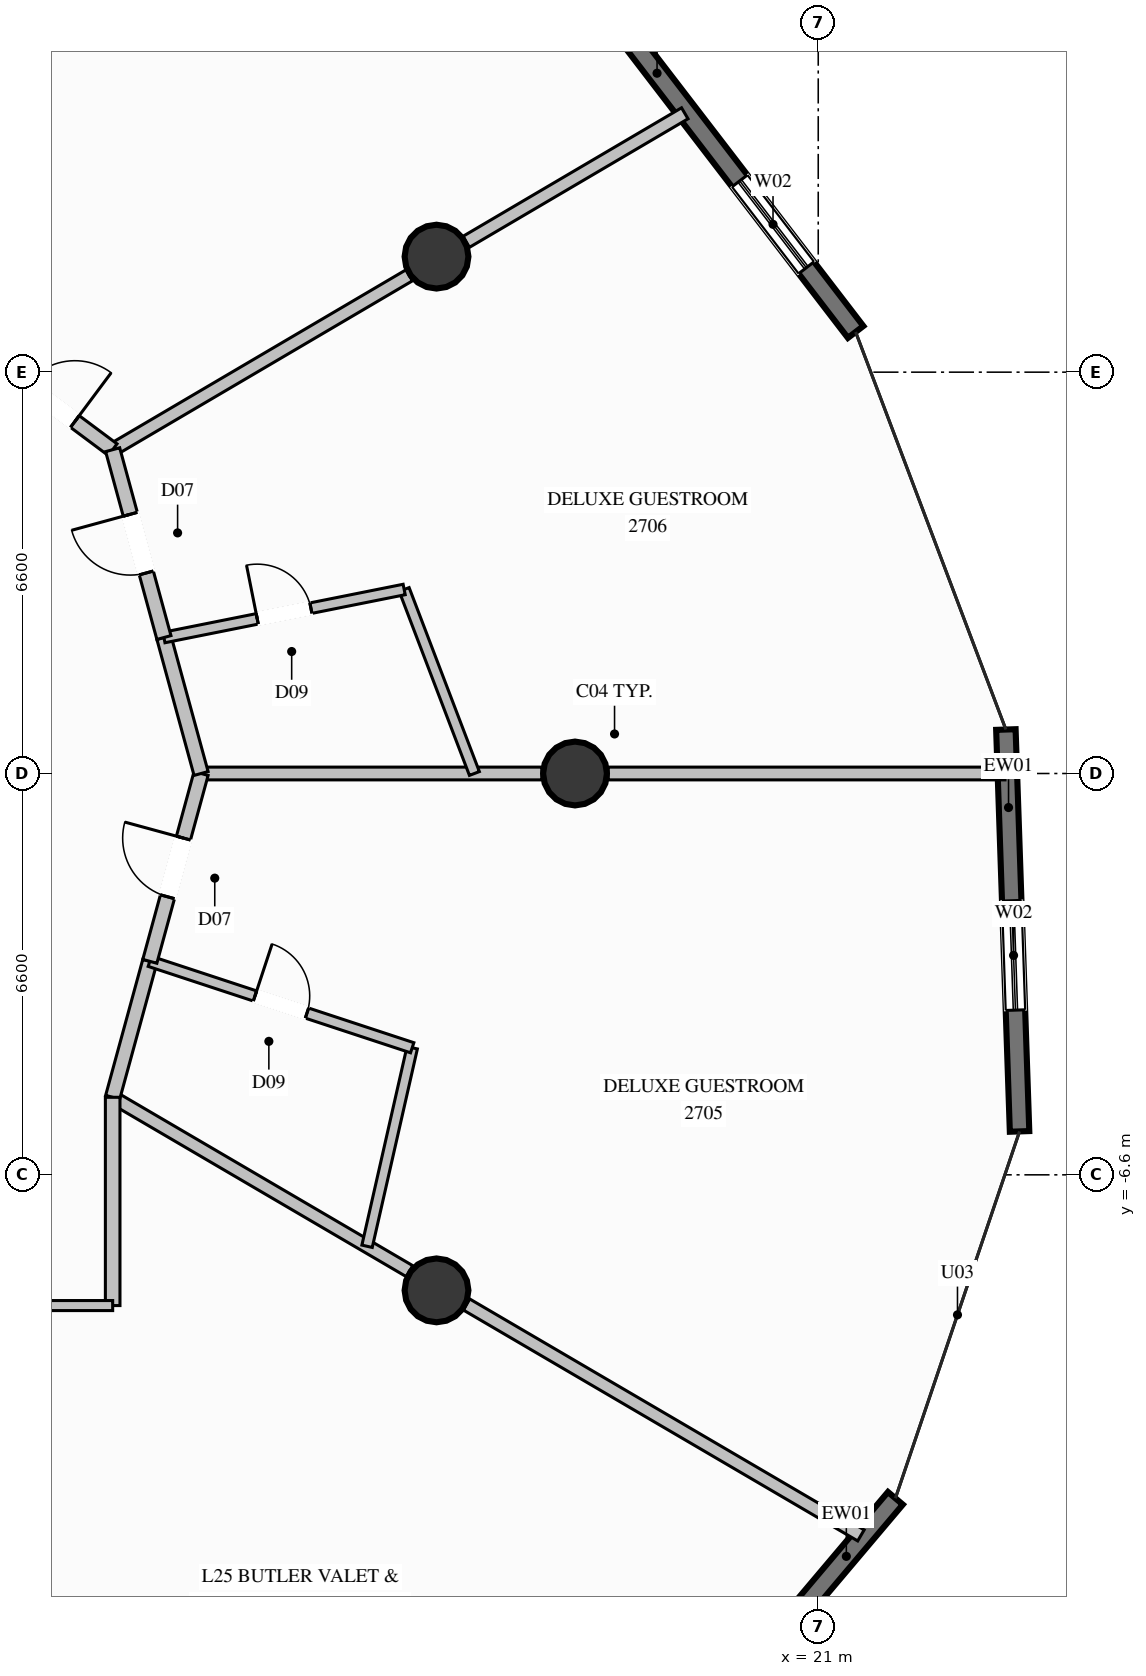
"""IFC4 building model, lengths in metres.
Left out: names, types, materials, properties, quantities, classifications, styles, units other than length and angle.
Written with IfcOpenShell. Run it as: python <this file> out.ifc"""

import sys

from ifc_helpers import new_model, si_unit, direction, frame, frame_2d, origin, origin_2d, place, context, subcontext, project, spatial, rectangle, circle, extrude, element, fill, save


model = new_model("IFC4")
c1 = context("Model", 3, precision=1e-05, world=origin(), true_north=direction((0.0, 1.0)))
c2 = subcontext(c1, "Body", "Model", "MODEL_VIEW")
j1 = project(units=[si_unit("LENGTHUNIT", "METRE"), si_unit("PLANEANGLEUNIT", "RADIAN")], contexts=[c1])
p1 = place(None, origin())
s1 = spatial("IfcSite", under=j1, at=p1, CompositionType="ELEMENT")
p2 = place(p1, origin())
s2 = spatial("IfcBuilding", under=s1, at=p2, CompositionType="ELEMENT")
p3 = place(p2, frame((0.0, 0.0, 102.6)))
s3 = spatial("IfcBuildingStorey", under=s2, at=p3, CompositionType="ELEMENT", Elevation=102.6)
for number, where, z_axis, x_axis in (
    (1, (17.0, 0.0, 0.0), (0.0, 0.0, 1.0), (1.0, 0.0, 0.0)),
    (2, (14.722, 8.5, 0.0), (0.0, 0.0, 1.0), (1.0, 0.0, 0.0)),
    (3, (14.722, -8.5, 0.0), (0.0, 0.0, 1.0), (1.0, 0.0, 0.0)),
):
    element("IfcColumn", number, at=place(p3, frame(where, z_axis=z_axis, x_axis=x_axis)), inside=s3, PredefinedType="COLUMN", context=c2, shape_type="SweptSolid", body=[
        extrude(circle(Radius=0.525, at=origin_2d()), origin(), (0.0, 0.0, 1.0), 3.6),
    ])
p4 = place(p3, frame((24.086, 0.723, 0.0), z_axis=(0.0, 0.0, 1.0), x_axis=(0.034040106065, -0.999420467661, 0.0)))
e4 = element("IfcWall", 4, at=p4, inside=s3, PredefinedType="SOLIDWALL", context=c2, shape_type="SweptSolid", body=[
    extrude(rectangle(XDim=6.613, YDim=0.32, at=frame_2d((3.306, 0.0))), origin(), (0.0, 0.0, 1.0), 3.35),
])
p5 = place(p4, frame((2.817, 0.0, 0.35)))
e5 = element("IfcOpeningElement", 5, at=p5, cuts=e4, PredefinedType="OPENING", context=c2, shape_type="SweptSolid", body=[
    extrude(rectangle(XDim=1.8, YDim=2.6, at=frame_2d((0.9, 1.3))), frame((0.0, 0.17, 0.0), z_axis=(0.0, -1.0, 0.0), x_axis=(1.0, 0.0, 0.0)), (0.0, 0.0, 1.0), 0.34),
])
p6 = place(p3, frame((17.142, 13.089, 0.0), z_axis=(0.0, 0.0, 1.0), x_axis=(0.608831916989, -0.793299247986, 0.0)))
e6 = element("IfcWall", 6, at=p6, inside=s3, PredefinedType="SOLIDWALL", context=c2, shape_type="SweptSolid", body=[
    extrude(rectangle(XDim=7.347, YDim=0.32, at=frame_2d((3.673, 0.0))), origin(), (0.0, 0.0, 1.0), 3.35),
])
p7 = place(p6, frame((4.215, 0.0, 0.35)))
e7 = element("IfcOpeningElement", 7, at=p7, cuts=e6, PredefinedType="OPENING", context=c2, shape_type="SweptSolid", body=[
    extrude(rectangle(XDim=1.8, YDim=2.6, at=frame_2d((0.9, 1.3))), frame((0.0, 0.17, 0.0), z_axis=(0.0, -1.0, 0.0), x_axis=(1.0, 0.0, 0.0)), (0.0, 0.0, 1.0), 0.34),
])
p8 = place(p3, frame((22.269, -11.919, 0.0), z_axis=(0.0, 0.0, 1.0), x_axis=(-0.645278763483, -0.763947195425, 0.0)))
e8 = element("IfcWall", 8, at=p8, inside=s3, PredefinedType="SOLIDWALL", context=c2, shape_type="SweptSolid", body=[
    extrude(rectangle(XDim=6.369, YDim=0.32, at=frame_2d((3.185, 0.0))), origin(), (0.0, 0.0, 1.0), 3.35),
])
p9 = place(p8, frame((2.751, 0.0, 0.35)))
e9 = element("IfcOpeningElement", 9, at=p9, cuts=e8, PredefinedType="OPENING", context=c2, shape_type="SweptSolid", body=[
    extrude(rectangle(XDim=1.8, YDim=2.6, at=frame_2d((0.9, 1.3))), frame((0.0, 0.17, 0.0), z_axis=(0.0, -1.0, 0.0), x_axis=(1.0, 0.0, 0.0)), (0.0, 0.0, 1.0), 0.34),
])
p10 = place(p3, frame((10.85, 0.0, 0.0), z_axis=(0.0, 0.0, 1.0), x_axis=(1.0, 0.0, 0.0)))
e10 = element("IfcWall", 10, at=p10, inside=s3, PredefinedType="PARTITIONING", context=c2, shape_type="SweptSolid", body=[
    extrude(rectangle(XDim=5.605, YDim=0.21, at=frame_2d((2.802, 0.0))), origin(), (0.0, 0.0, 1.0), 3.35),
])
p11 = place(p3, frame((17.545, 0.0, 0.0), z_axis=(0.0, 0.0, 1.0), x_axis=(1.0, 0.0, 0.0)))
e11 = element("IfcWall", 11, at=p11, inside=s3, PredefinedType="PARTITIONING", context=c2, shape_type="SweptSolid", body=[
    extrude(rectangle(XDim=6.526, YDim=0.21, at=frame_2d((3.263, 0.0))), origin(), (0.0, 0.0, 1.0), 3.35),
])
p12 = place(p3, frame((9.396, 5.325, 0.0), z_axis=(0.0, 0.0, 1.0), x_axis=(0.862032950085, 0.506852239778, 0.0)))
e12 = element("IfcWall", 12, at=p12, inside=s3, PredefinedType="PARTITIONING", context=c2, shape_type="SweptSolid", body=[
    extrude(rectangle(XDim=5.656, YDim=0.21, at=frame_2d((2.828, 0.0))), origin(), (0.0, 0.0, 1.0), 2.791),
])
p13 = place(p3, frame((15.21, 8.743, 0.0), z_axis=(0.0, 0.0, 1.0), x_axis=(0.862004936616, 0.506899880894, 0.0)))
e13 = element("IfcWall", 13, at=p13, inside=s3, PredefinedType="PARTITIONING", context=c2, shape_type="SweptSolid", body=[
    extrude(rectangle(XDim=4.17, YDim=0.21, at=frame_2d((2.085, 0.0))), origin(), (0.0, 0.0, 1.0), 3.35),
])
p14 = place(p3, frame((9.396, -5.325, 0.0), z_axis=(0.0, 0.0, 1.0), x_axis=(0.862912125579, -0.505353998232, 0.0)))
e14 = element("IfcWall", 14, at=p14, inside=s3, PredefinedType="PARTITIONING", context=c2, shape_type="SweptSolid", body=[
    extrude(rectangle(XDim=5.658, YDim=0.21, at=frame_2d((2.829, 0.0))), origin(), (0.0, 0.0, 1.0), 2.791),
])
p15 = place(p3, frame((15.215, -8.732, 0.0), z_axis=(0.0, 0.0, 1.0), x_axis=(0.862960241997, -0.505271828556, 0.0)))
e15 = element("IfcWall", 15, at=p15, inside=s3, PredefinedType="PARTITIONING", context=c2, shape_type="SweptSolid", body=[
    extrude(rectangle(XDim=7.517, YDim=0.21, at=frame_2d((3.758, 0.0))), origin(), (0.0, 0.0, 1.0), 3.35),
])
p16 = place(p3, frame((7.35, 6.85, 0.0), z_axis=(0.0, 0.0, 1.0), x_axis=(0.8017416961, -0.597670689205, 0.0)))
e16 = element("IfcWall", 16, at=p16, inside=s3, PredefinedType="PARTITIONING", context=c2, shape_type="SweptSolid", body=[
    extrude(rectangle(XDim=2.552, YDim=0.24, at=frame_2d((1.276, 0.0))), origin(), (0.0, 0.0, 1.0), 3.35),
])
p17 = place(p16, frame((0.776, 0.0, 0.0)))
e17 = element("IfcOpeningElement", 17, at=p17, cuts=e16, PredefinedType="OPENING", context=c2, shape_type="SweptSolid", body=[
    extrude(rectangle(XDim=1.0, YDim=2.2, at=frame_2d((0.5, 1.1))), frame((0.0, 0.13, 0.0), z_axis=(0.0, -1.0, 0.0), x_axis=(1.0, 0.0, 0.0)), (0.0, 0.0, 1.0), 0.26),
])
p18 = place(p3, frame((9.396, -5.325, 0.0), z_axis=(0.0, 0.0, 1.0), x_axis=(0.263643210908, 0.964620265878, 0.0)))
e18 = element("IfcWall", 18, at=p18, inside=s3, PredefinedType="PARTITIONING", context=c2, shape_type="SweptSolid", body=[
    extrude(rectangle(XDim=2.318, YDim=0.24, at=frame_2d((1.159, 0.0))), origin(), (0.0, 0.0, 1.0), 3.35),
])
p19 = place(p3, frame((13.58, -7.775, 0.0), z_axis=(0.0, 0.0, 1.0), x_axis=(0.221599041774, 0.975137869578, 0.0)))
e19 = element("IfcWall", 19, at=p19, inside=s3, PredefinedType="PLUMBINGWALL", context=c2, shape_type="SweptSolid", body=[
    extrude(rectangle(XDim=3.348, YDim=0.175, at=frame_2d((1.674, 0.0))), origin(), (0.0, 0.0, 1.0), 3.35),
])
p20 = place(p3, frame((10.007, -3.089, 0.0), z_axis=(0.0, 0.0, 1.0), x_axis=(0.949827092004, -0.312775471057, 0.0)))
e20 = element("IfcWall", 20, at=p20, inside=s3, PredefinedType="PLUMBINGWALL", context=c2, shape_type="SweptSolid", body=[
    extrude(rectangle(XDim=4.543, YDim=0.175, at=frame_2d((2.271, 0.0))), origin(), (0.0, 0.0, 1.0), 3.35),
])
p21 = place(p20, frame((1.821, 0.0, 0.0)))
e21 = element("IfcOpeningElement", 21, at=p21, cuts=e20, PredefinedType="OPENING", context=c2, shape_type="SweptSolid", body=[
    extrude(rectangle(XDim=0.9, YDim=2.1, at=frame_2d((0.45, 1.05))), frame((0.0, 0.098, 0.0), z_axis=(0.0, -1.0, 0.0), x_axis=(1.0, 0.0, 0.0)), (0.0, 0.0, 1.0), 0.195),
])
p22 = place(p3, frame((10.007, -3.089, 0.0), z_axis=(0.0, 0.0, 1.0), x_axis=(0.263272237376, 0.964721581093, 0.0)))
e22 = element("IfcWall", 22, at=p22, inside=s3, PredefinedType="PARTITIONING", context=c2, shape_type="SweptSolid", body=[
    extrude(rectangle(XDim=3.202, YDim=0.24, at=frame_2d((1.601, 0.0))), origin(), (0.0, 0.0, 1.0), 2.985),
])
p23 = place(p22, frame((1.101, 0.0, 0.0)))
e23 = element("IfcOpeningElement", 23, at=p23, cuts=e22, PredefinedType="OPENING", context=c2, shape_type="SweptSolid", body=[
    extrude(rectangle(XDim=1.0, YDim=2.2, at=frame_2d((0.5, 1.1))), frame((0.0, 0.13, 0.0), z_axis=(0.0, -1.0, 0.0), x_axis=(1.0, 0.0, 0.0)), (0.0, 0.0, 1.0), 0.26),
])
p24 = place(p3, frame((10.85, 0.0, 0.0), z_axis=(0.0, 0.0, 1.0), x_axis=(-0.263616426241, 0.964627586074, 0.0)))
e24 = element("IfcWall", 24, at=p24, inside=s3, PredefinedType="PARTITIONING", context=c2, shape_type="SweptSolid", body=[
    extrude(rectangle(XDim=2.318, YDim=0.24, at=frame_2d((1.159, 0.0))), origin(), (0.0, 0.0, 1.0), 2.985),
])
p25 = place(p3, frame((15.345, 0.0, 0.0), z_axis=(0.0, 0.0, 1.0), x_axis=(-0.35661902988, 0.934249895653, 0.0)))
e25 = element("IfcWall", 25, at=p25, inside=s3, PredefinedType="PLUMBINGWALL", context=c2, shape_type="SweptSolid", body=[
    extrude(rectangle(XDim=3.239, YDim=0.175, at=frame_2d((1.619, 0.0))), origin(), (0.0, 0.0, 1.0), 3.35),
])
p26 = place(p3, frame((10.239, 2.236, 0.0), z_axis=(0.0, 0.0, 1.0), x_axis=(0.980599315693, 0.196022912085, 0.0)))
e26 = element("IfcWall", 26, at=p26, inside=s3, PredefinedType="PLUMBINGWALL", context=c2, shape_type="SweptSolid", body=[
    extrude(rectangle(XDim=4.029, YDim=0.175, at=frame_2d((2.015, 0.0))), origin(), (0.0, 0.0, 1.0), 3.35),
])
p27 = place(p26, frame((1.565, 0.0, 0.0)))
e27 = element("IfcOpeningElement", 27, at=p27, cuts=e26, PredefinedType="OPENING", context=c2, shape_type="SweptSolid", body=[
    extrude(rectangle(XDim=0.9, YDim=2.1, at=frame_2d((0.45, 1.05))), frame((0.0, 0.098, 0.0), z_axis=(0.0, -1.0, 0.0), x_axis=(1.0, 0.0, 0.0)), (0.0, 0.0, 1.0), 0.195),
])
p28 = place(p3, frame((10.239, 2.236, 0.0), z_axis=(0.0, 0.0, 1.0), x_axis=(-0.26329160366, 0.964716295831, 0.0)))
e28 = element("IfcWall", 28, at=p28, inside=s3, PredefinedType="PARTITIONING", context=c2, shape_type="SweptSolid", body=[
    extrude(rectangle(XDim=3.202, YDim=0.24, at=frame_2d((1.601, 0.0))), origin(), (0.0, 0.0, 1.0), 3.35),
])
p29 = place(p28, frame((1.101, 0.0, 0.0)))
e29 = element("IfcOpeningElement", 29, at=p29, cuts=e28, PredefinedType="OPENING", context=c2, shape_type="SweptSolid", body=[
    extrude(rectangle(XDim=1.0, YDim=2.2, at=frame_2d((0.5, 1.1))), frame((0.0, 0.13, 0.0), z_axis=(0.0, -1.0, 0.0), x_axis=(1.0, 0.0, 0.0)), (0.0, 0.0, 1.0), 0.26),
])
p30 = place(p3, frame((5.168, -8.75, 0.0), z_axis=(0.0, 0.0, 1.0), x_axis=(0.319791389232, -0.947487977429, 0.0)))
e30 = element("IfcWall", 30, at=p30, inside=s3, PredefinedType="PARTITIONING", context=c2, shape_type="SweptSolid", body=[
    extrude(rectangle(XDim=12.468, YDim=0.21, at=frame_2d((6.234, 0.0))), origin(), (0.0, 0.0, 1.0), 3.35),
])
p31 = place(p3, frame((9.396, -8.75, 0.0), z_axis=(0.0, 0.0, 1.0), x_axis=(0.0, 1.0, 0.0)))
e31 = element("IfcWall", 31, at=p31, inside=s3, PredefinedType="PARTITIONING", context=c2, shape_type="SweptSolid", body=[
    extrude(rectangle(XDim=3.425, YDim=0.24, at=frame_2d((1.712, 0.0))), origin(), (0.0, 0.0, 1.0), 3.35),
])
p32 = place(p3, frame((5.168, -8.75, 0.0), z_axis=(0.0, 0.0, 1.0), x_axis=(1.0, 0.0, 0.0)))
e32 = element("IfcWall", 32, at=p32, inside=s3, PredefinedType="PARTITIONING", context=c2, shape_type="SweptSolid", body=[
    extrude(rectangle(XDim=4.228, YDim=0.165, at=frame_2d((2.114, 0.0))), origin(), (0.0, 0.0, 1.0), 3.35),
])
p33 = place(p32, frame((1.639, 0.0, 0.0)))
e33 = element("IfcOpeningElement", 33, at=p33, cuts=e32, PredefinedType="OPENING", context=c2, shape_type="SweptSolid", body=[
    extrude(rectangle(XDim=0.95, YDim=2.1, at=frame_2d((0.475, 1.05))), frame((0.0, 0.093, 0.0), z_axis=(0.0, -1.0, 0.0), x_axis=(1.0, 0.0, 0.0)), (0.0, 0.0, 1.0), 0.185),
])
p34 = place(p5, origin())
e34 = element("IfcWindow", 34, at=p34, inside=s3, PartitioningType="SINGLE_PANEL", PredefinedType="WINDOW", context=c2, shape_type="SweptSolid", body=[
    extrude(rectangle(XDim=1.8, YDim=2.6, at=frame_2d((0.9, 1.3))), frame((0.0, 0.03, 0.0), z_axis=(0.0, -1.0, 0.0), x_axis=(1.0, 0.0, 0.0)), (0.0, 0.0, 1.0), 0.06),
])
fill(e5, e34)
p35 = place(p7, origin())
e35 = element("IfcWindow", 35, at=p35, inside=s3, PartitioningType="SINGLE_PANEL", PredefinedType="WINDOW", context=c2, shape_type="SweptSolid", body=[
    extrude(rectangle(XDim=1.8, YDim=2.6, at=frame_2d((0.9, 1.3))), frame((0.0, 0.03, 0.0), z_axis=(0.0, -1.0, 0.0), x_axis=(1.0, 0.0, 0.0)), (0.0, 0.0, 1.0), 0.06),
])
fill(e7, e35)
p36 = place(p17, origin())
e36 = element("IfcDoor", 36, at=p36, inside=s3, OperationType="SINGLE_SWING_RIGHT", PredefinedType="DOOR", context=c2, shape_type="SweptSolid", body=[
    extrude(rectangle(XDim=1.0, YDim=2.2, at=frame_2d((0.5, 1.1))), frame((0.0, 0.025, 0.0), z_axis=(0.0, -1.0, 0.0), x_axis=(1.0, 0.0, 0.0)), (0.0, 0.0, 1.0), 0.05),
])
fill(e17, e36)
p37 = place(p21, origin())
e37 = element("IfcDoor", 37, at=p37, inside=s3, OperationType="SINGLE_SWING_LEFT", PredefinedType="DOOR", context=c2, shape_type="SweptSolid", body=[
    extrude(rectangle(XDim=0.9, YDim=2.1, at=frame_2d((0.45, 1.05))), frame((0.0, 0.025, 0.0), z_axis=(0.0, -1.0, 0.0), x_axis=(1.0, 0.0, 0.0)), (0.0, 0.0, 1.0), 0.05),
])
fill(e21, e37)
p38 = place(p23, origin())
e38 = element("IfcDoor", 38, at=p38, inside=s3, OperationType="SINGLE_SWING_RIGHT", PredefinedType="DOOR", context=c2, shape_type="SweptSolid", body=[
    extrude(rectangle(XDim=1.0, YDim=2.2, at=frame_2d((0.5, 1.1))), frame((0.0, 0.025, 0.0), z_axis=(0.0, -1.0, 0.0), x_axis=(1.0, 0.0, 0.0)), (0.0, 0.0, 1.0), 0.05),
])
fill(e23, e38)
p39 = place(p27, origin())
e39 = element("IfcDoor", 39, at=p39, inside=s3, OperationType="SINGLE_SWING_LEFT", PredefinedType="DOOR", context=c2, shape_type="SweptSolid", body=[
    extrude(rectangle(XDim=0.9, YDim=2.1, at=frame_2d((0.45, 1.05))), frame((0.0, 0.025, 0.0), z_axis=(0.0, -1.0, 0.0), x_axis=(1.0, 0.0, 0.0)), (0.0, 0.0, 1.0), 0.05),
])
fill(e27, e39)
p40 = place(p29, origin())
e40 = element("IfcDoor", 40, at=p40, inside=s3, OperationType="SINGLE_SWING_RIGHT", PredefinedType="DOOR", context=c2, shape_type="SweptSolid", body=[
    extrude(rectangle(XDim=1.0, YDim=2.2, at=frame_2d((0.5, 1.1))), frame((0.0, 0.025, 0.0), z_axis=(0.0, -1.0, 0.0), x_axis=(1.0, 0.0, 0.0)), (0.0, 0.0, 1.0), 0.05),
])
fill(e29, e40)
save(model, sys.argv[1])
